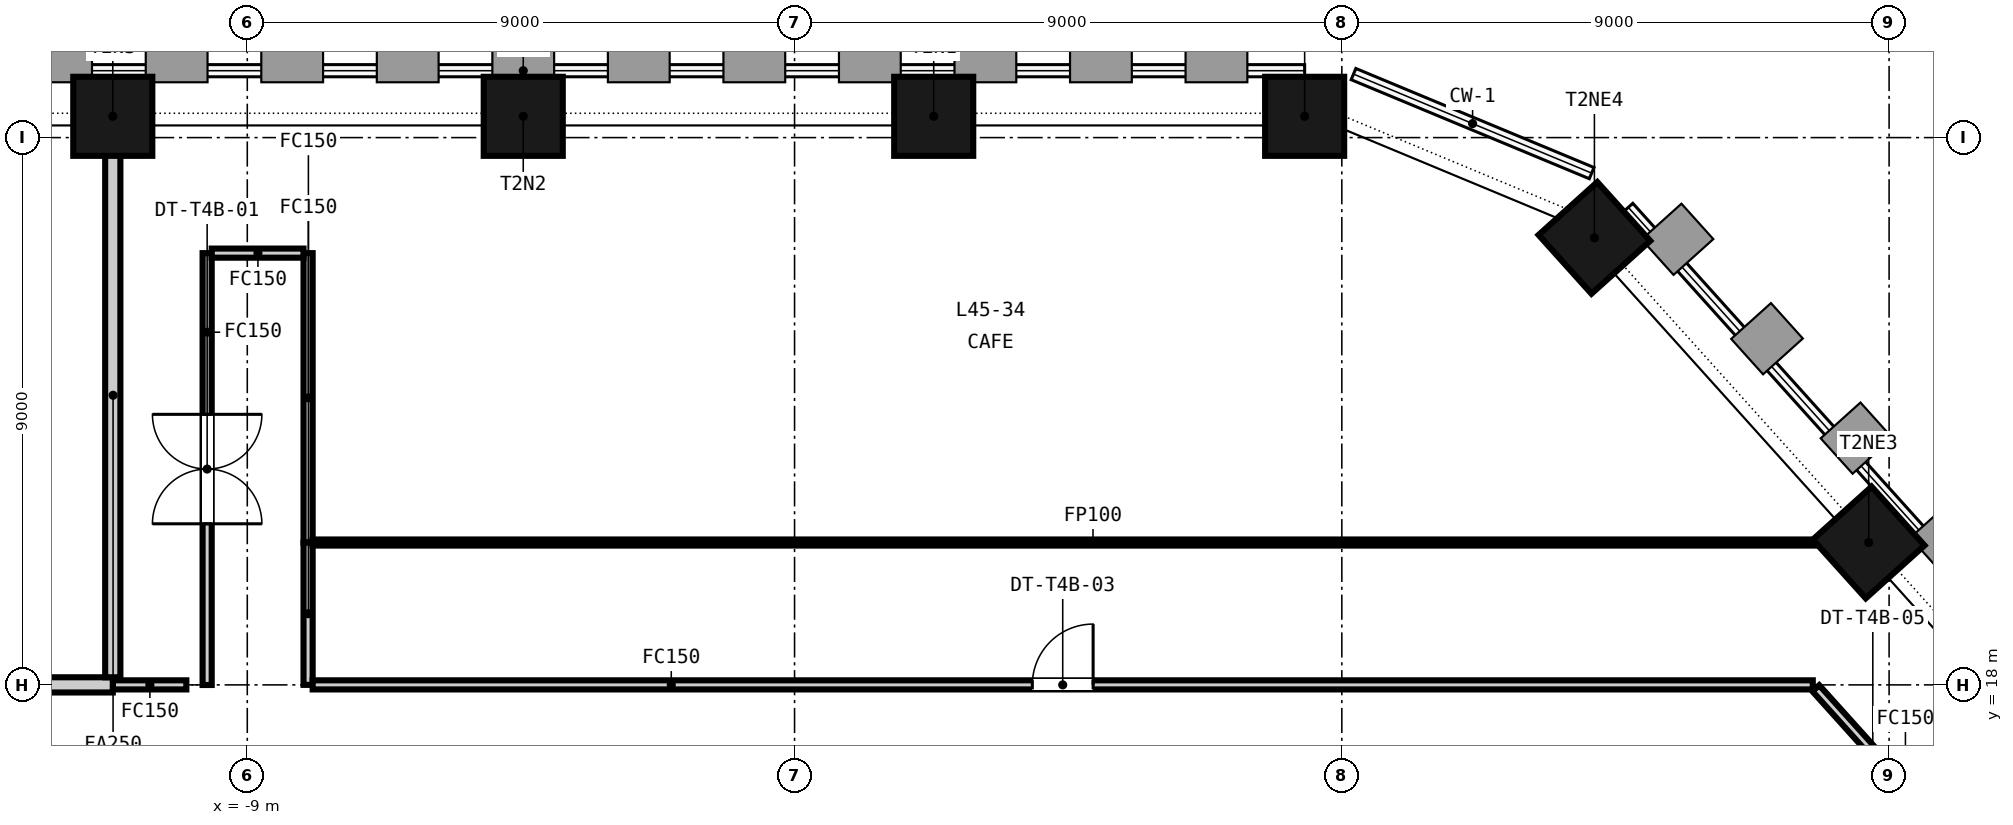
"""IFC4 building model, lengths in metres.
Left out: names, types, materials, properties, quantities, classifications, styles, units other than length and angle.
Written with IfcOpenShell. Run it as: python <this file> out.ifc"""

import sys

from ifc_helpers import new_model, si_unit, direction, frame, frame_2d, origin, origin_2d, place, context, subcontext, project, spatial, rectangle, extrude, element, fill, save


model = new_model("IFC4")
c1 = context("Model", 3, precision=1e-05, world=origin(), true_north=direction((0.0, 1.0)))
c2 = subcontext(c1, "Body", "Model", "MODEL_VIEW")
j1 = project(units=[si_unit("LENGTHUNIT", "METRE"), si_unit("PLANEANGLEUNIT", "RADIAN")], contexts=[c1])
p1 = place(None, origin())
s1 = spatial("IfcSite", under=j1, at=p1, CompositionType="ELEMENT")
p2 = place(p1, origin())
s2 = spatial("IfcBuilding", under=s1, at=p2, CompositionType="ELEMENT")
p3 = place(p2, frame((0.0, 0.0, 181.75)))
s3 = spatial("IfcBuildingStorey", under=s2, at=p3, CompositionType="ELEMENT", Elevation=181.75)
for number, where, z_axis, x_axis in (
    (1, (8.389, 27.35, -0.15), (0.0, 0.0, 1.0), (-1.0, 0.0, 0.0)),
    (2, (2.288, 27.35, -0.15), (0.0, 0.0, 1.0), (-1.0, 0.0, 0.0)),
    (3, (-4.462, 27.35, -0.15), (0.0, 0.0, 1.0), (-1.0, 0.0, 0.0)),
    (4, (-11.212, 27.35, -0.15), (0.0, 0.0, 1.0), (-1.0, 0.0, 0.0)),
    (5, (17.664, 20.342, -0.15), (0.0, 0.0, 1.0), (-0.669, 0.743, 0.0)),
    (6, (13.154, 25.351, -0.15), (0.0, 0.0, 1.0), (-0.669, 0.743, 0.0)),
):
    element("IfcColumn", number, at=place(p3, frame(where, z_axis=z_axis, x_axis=x_axis)), inside=s3, PredefinedType="COLUMN", context=c2, shape_type="SweptSolid", body=[
        extrude(rectangle(XDim=1.3, YDim=1.3, at=origin_2d()), origin(), (0.0, 0.0, 1.0), 3.65),
    ])
p4 = place(p3, frame((-8.0, 25.1, 0.0), z_axis=(0.0, 0.0, 1.0), x_axis=(0.0, -1.0, 0.0)))
e7 = element("IfcWall", 7, at=p4, inside=s3, PredefinedType="PARTITIONING", context=c2, shape_type="SweptSolid", body=[
    extrude(rectangle(XDim=4.759, YDim=0.15, at=frame_2d((2.379, 0.0))), origin(), (0.0, 0.0, 1.0), 2.741),
])
p5 = place(p3, frame((-8.0, 20.341, 0.0), z_axis=(0.0, 0.0, 1.0), x_axis=(0.0, -1.0, 0.0)))
e8 = element("IfcWall", 8, at=p5, inside=s3, PredefinedType="PARTITIONING", context=c2, shape_type="SweptSolid", body=[
    extrude(rectangle(XDim=2.341, YDim=0.15, at=frame_2d((1.17, 0.0))), origin(), (0.0, 0.0, 1.0), 2.741),
])
p6 = place(p3, frame((-11.212, 18.0, 0.0), z_axis=(0.0, 0.0, 1.0), x_axis=(1.0, 0.0, 0.0)))
e9 = element("IfcWall", 9, at=p6, inside=s3, PredefinedType="PARTITIONING", context=c2, shape_type="SweptSolid", body=[
    extrude(rectangle(XDim=1.21, YDim=0.15, at=frame_2d((0.605, 0.0))), origin(), (0.0, 0.0, 1.0), 2.741),
])
p7 = place(p3, frame((-9.66, 17.998, 0.0), z_axis=(0.0, 0.0, 1.0), x_axis=(0.0, 1.0, 0.0)))
e10 = element("IfcWall", 10, at=p7, inside=s3, PredefinedType="PARTITIONING", context=c2, shape_type="SweptSolid", body=[
    extrude(rectangle(XDim=7.102, YDim=0.15, at=frame_2d((3.551, 0.0))), origin(), (0.0, 0.0, 1.0), 2.741),
])
p8 = place(p7, frame((2.651, 0.0, 0.0)))
e11 = element("IfcOpeningElement", 11, at=p8, cuts=e10, PredefinedType="OPENING", context=c2, shape_type="SweptSolid", body=[
    extrude(rectangle(XDim=1.8, YDim=2.1, at=frame_2d((0.9, 1.05))), frame((0.0, 0.085, 0.0), z_axis=(0.0, -1.0, 0.0), x_axis=(1.0, 0.0, 0.0)), (0.0, 0.0, 1.0), 0.17),
])
p9 = place(p3, frame((-9.585, 25.1, 0.0), z_axis=(0.0, 0.0, 1.0), x_axis=(1.0, 0.0, 0.0)))
e12 = element("IfcWall", 12, at=p9, inside=s3, PredefinedType="PARTITIONING", context=c2, shape_type="SweptSolid", body=[
    extrude(rectangle(XDim=1.51, YDim=0.15, at=frame_2d((0.755, 0.0))), origin(), (0.0, 0.0, 1.0), 2.741),
])
p10 = place(p3, frame((-7.925, 20.341, 0.0), z_axis=(0.0, 0.0, 1.0), x_axis=(1.0, 0.0, 0.0)))
e13 = element("IfcWall", 13, at=p10, inside=s3, PredefinedType="PARTITIONING", context=c2, shape_type="SweptSolid", body=[
    extrude(rectangle(XDim=25.656, YDim=0.1, at=frame_2d((12.828, 0.0))), origin(), (0.0, 0.0, 1.0), 2.741),
])
p11 = place(p3, frame((-18.436, 18.0, 0.0), z_axis=(0.0, 0.0, 1.0), x_axis=(1.0, 0.0, 0.0)))
e14 = element("IfcWall", 14, at=p11, inside=s3, PredefinedType="PARTITIONING", context=c2, shape_type="SweptSolid", body=[
    extrude(rectangle(XDim=7.224, YDim=0.25, at=frame_2d((3.612, 0.0))), origin(), (0.0, 0.0, 1.0), 2.741),
])
p12 = place(p11, frame((2.712, 0.0, 0.0)))
e15 = element("IfcOpeningElement", 15, at=p12, cuts=e14, PredefinedType="OPENING", context=c2, shape_type="SweptSolid", body=[
    extrude(rectangle(XDim=1.8, YDim=2.1, at=frame_2d((0.9, 1.05))), frame((0.0, 0.135, 0.0), z_axis=(0.0, -1.0, 0.0), x_axis=(1.0, 0.0, 0.0)), (0.0, 0.0, 1.0), 0.27),
])
p13 = place(p3, frame((-11.212, 18.125, 0.0), z_axis=(0.0, 0.0, 1.0), x_axis=(0.0, 1.0, 0.0)))
e16 = element("IfcWall", 16, at=p13, inside=s3, PredefinedType="PARTITIONING", context=c2, shape_type="SweptSolid", body=[
    extrude(rectangle(XDim=9.275, YDim=0.25, at=frame_2d((4.637, 0.0))), origin(), (0.0, 0.0, 1.0), 2.741),
])
p14 = place(p3, frame((-7.925, 18.0, 0.0), z_axis=(0.0, 0.0, 1.0), x_axis=(1.0, 0.0, 0.0)))
e17 = element("IfcWall", 17, at=p14, inside=s3, PredefinedType="PARTITIONING", context=c2, shape_type="SweptSolid", body=[
    extrude(rectangle(XDim=24.67, YDim=0.15, at=frame_2d((12.335, 0.0))), origin(), (0.0, 0.0, 1.0), 2.741),
])
p15 = place(p14, frame((11.835, 0.0, 0.0)))
e18 = element("IfcOpeningElement", 18, at=p15, cuts=e17, PredefinedType="OPENING", context=c2, shape_type="SweptSolid", body=[
    extrude(rectangle(XDim=1.0, YDim=2.1, at=frame_2d((0.5, 1.05))), frame((0.0, 0.085, 0.0), z_axis=(0.0, -1.0, 0.0), x_axis=(1.0, 0.0, 0.0)), (0.0, 0.0, 1.0), 0.17),
])
p16 = place(p3, frame((16.795, 17.944, 0.0), z_axis=(0.0, 0.0, 1.0), x_axis=(0.66903540409, -0.743230534945, 0.0)))
e19 = element("IfcWall", 19, at=p16, inside=s3, PredefinedType="PARTITIONING", context=c2, shape_type="SweptSolid", body=[
    extrude(rectangle(XDim=4.39, YDim=0.15, at=frame_2d((2.195, 0.0))), origin(), (0.0, 0.0, 1.0), 2.741),
])
p17 = place(p8, origin())
e20 = element("IfcDoor", 20, at=p17, inside=s3, OperationType="DOUBLE_DOOR_DOUBLE_SWING", PredefinedType="DOOR", context=c2, shape_type="SweptSolid", body=[
    extrude(rectangle(XDim=1.8, YDim=2.1, at=frame_2d((0.9, 1.05))), frame((0.0, 0.025, 0.0), z_axis=(0.0, -1.0, 0.0), x_axis=(1.0, 0.0, 0.0)), (0.0, 0.0, 1.0), 0.05),
])
fill(e11, e20)
p18 = place(p15, origin())
e21 = element("IfcDoor", 21, at=p18, inside=s3, OperationType="SINGLE_SWING_RIGHT", PredefinedType="DOOR", context=c2, shape_type="SweptSolid", body=[
    extrude(rectangle(XDim=1.0, YDim=2.1, at=frame_2d((0.5, 1.05))), frame((0.0, 0.025, 0.0), z_axis=(0.0, -1.0, 0.0), x_axis=(1.0, 0.0, 0.0)), (0.0, 0.0, 1.0), 0.05),
])
fill(e18, e21)
save(model, sys.argv[1])
